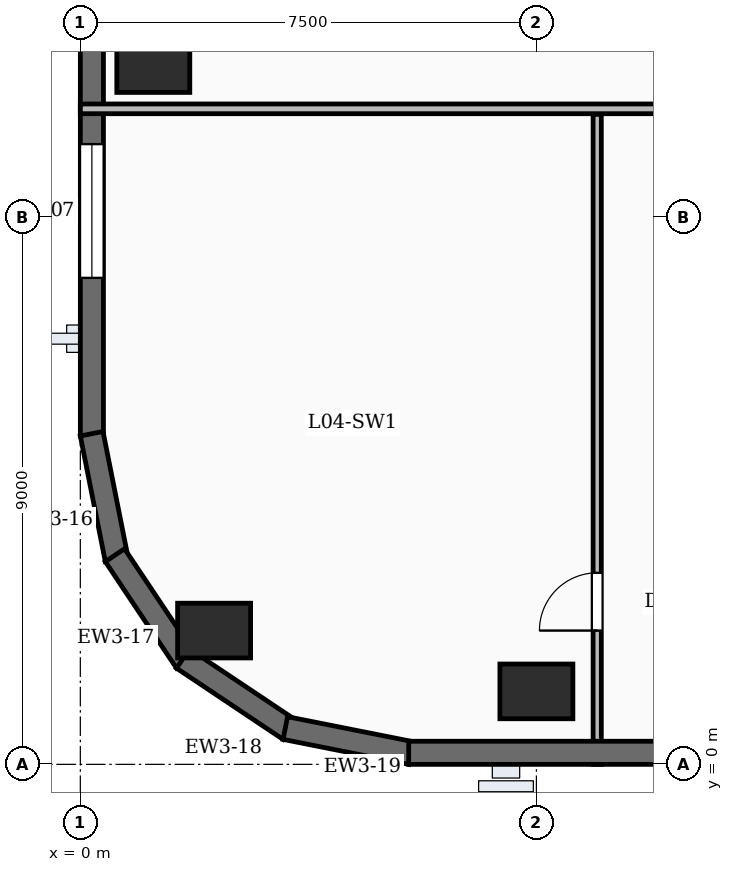
"""IFC4 building model, lengths in metres.
Left out: names, types, materials, properties, quantities, classifications, styles, units other than length and angle.
Written with IfcOpenShell. Run it as: python <this file> out.ifc"""

import sys

from ifc_helpers import new_model, si_unit, direction, frame, frame_2d, origin, origin_2d, place, context, subcontext, project, spatial, rectangle, extrude, element, fill, save


model = new_model("IFC4")
c1 = context("Model", 3, precision=1e-05, world=origin(), true_north=direction((0.0, 1.0)))
c2 = subcontext(c1, "Body", "Model", "MODEL_VIEW")
j1 = project(units=[si_unit("LENGTHUNIT", "METRE"), si_unit("PLANEANGLEUNIT", "RADIAN")], contexts=[c1])
p1 = place(None, origin())
s1 = spatial("IfcSite", under=j1, at=p1, CompositionType="ELEMENT")
p2 = place(p1, origin())
s2 = spatial("IfcBuilding", under=s1, at=p2, CompositionType="ELEMENT")
p3 = place(p2, frame((0.0, 0.0, 23.0)))
s3 = spatial("IfcBuildingStorey", under=s2, at=p3, CompositionType="ELEMENT", Elevation=23.0)
for number, where, z_axis, x_axis in (
    (1, (2.2, 2.2, -0.35), (0.0, 0.0, 1.0), (1.0, 0.0, 0.0)),
    (2, (7.5, 1.2, -0.35), (0.0, 0.0, 1.0), (1.0, 0.0, 0.0)),
    (3, (1.2, 11.5, -0.35), (0.0, 0.0, 1.0), (1.0, 0.0, 0.0)),
):
    element("IfcColumn", number, at=place(p3, frame(where, z_axis=z_axis, x_axis=x_axis)), inside=s3, PredefinedType="COLUMN", context=c2, shape_type="SweptSolid", body=[
        extrude(rectangle(XDim=1.2, YDim=0.9, at=origin_2d()), origin(), (0.0, 0.0, 1.0), 5.0),
    ])
p4 = place(p3, frame((0.19, 5.4, 0.0), z_axis=(0.0, 0.0, 1.0), x_axis=(0.0, 1.0, 0.0)))
e4 = element("IfcWall", 4, at=p4, inside=s3, PredefinedType="SOLIDWALL", context=c2, shape_type="SweptSolid", body=[
    extrude(rectangle(XDim=43.7, YDim=0.38, at=frame_2d((21.85, 0.0))), origin(), (0.0, 0.0, 1.0), 4.65),
])
p5 = place(p4, frame((2.6, 0.0, 0.95)))
e5 = element("IfcOpeningElement", 5, at=p5, cuts=e4, PredefinedType="OPENING", context=c2, shape_type="SweptSolid", body=[
    extrude(rectangle(XDim=2.2, YDim=2.5, at=frame_2d((1.1, 1.25))), frame((0.0, 0.2, 0.0), z_axis=(0.0, -1.0, 0.0), x_axis=(1.0, 0.0, 0.0)), (0.0, 0.0, 1.0), 0.4),
])
p6 = place(p4, frame((8.0, 0.0, 0.95)))
e6 = element("IfcOpeningElement", 6, at=p6, cuts=e4, PredefinedType="OPENING", context=c2, shape_type="SweptSolid", body=[
    extrude(rectangle(XDim=2.2, YDim=2.5, at=frame_2d((1.1, 1.25))), frame((0.0, 0.2, 0.0), z_axis=(0.0, -1.0, 0.0), x_axis=(1.0, 0.0, 0.0)), (0.0, 0.0, 1.0), 0.4),
])
p7 = place(p4, frame((18.8, 0.0, 0.95)))
e7 = element("IfcOpeningElement", 7, at=p7, cuts=e4, PredefinedType="OPENING", context=c2, shape_type="SweptSolid", body=[
    extrude(rectangle(XDim=2.2, YDim=2.5, at=frame_2d((1.1, 1.25))), frame((0.0, 0.2, 0.0), z_axis=(0.0, -1.0, 0.0), x_axis=(1.0, 0.0, 0.0)), (0.0, 0.0, 1.0), 0.4),
])
p8 = place(p4, frame((24.2, 0.0, 0.95)))
e8 = element("IfcOpeningElement", 8, at=p8, cuts=e4, PredefinedType="OPENING", context=c2, shape_type="SweptSolid", body=[
    extrude(rectangle(XDim=2.2, YDim=2.5, at=frame_2d((1.1, 1.25))), frame((0.0, 0.2, 0.0), z_axis=(0.0, -1.0, 0.0), x_axis=(1.0, 0.0, 0.0)), (0.0, 0.0, 1.0), 0.4),
])
p9 = place(p4, frame((29.6, 0.0, 0.95)))
e9 = element("IfcOpeningElement", 9, at=p9, cuts=e4, PredefinedType="OPENING", context=c2, shape_type="SweptSolid", body=[
    extrude(rectangle(XDim=2.2, YDim=2.5, at=frame_2d((1.1, 1.25))), frame((0.0, 0.2, 0.0), z_axis=(0.0, -1.0, 0.0), x_axis=(1.0, 0.0, 0.0)), (0.0, 0.0, 1.0), 0.4),
])
for number, where, z_axis, x_axis in (
    (10, (0.597, 3.371, 0.0), (0.0, 0.0, 1.0), (-0.195, 0.981, 0.0)),
    (11, (1.74, 1.687, 0.0), (0.0, 0.0, 1.0), (-0.556, 0.832, 0.0)),
    (12, (3.439, 0.569, 0.0), (0.0, 0.0, 1.0), (-0.832, 0.556, 0.0)),
    (13, (5.437, 0.186, 0.0), (0.0, 0.0, 1.0), (-0.981, 0.195, 0.0)),
):
    element("IfcWall", number, at=place(p3, frame(where, z_axis=z_axis, x_axis=x_axis)), inside=s3, PredefinedType="SOLIDWALL", context=c2, shape_type="SweptSolid", body=[
        extrude(rectangle(XDim=2.107, YDim=0.38, at=frame_2d((1.053, 0.0))), origin(), (0.0, 0.0, 1.0), 4.65),
    ])
p10 = place(p3, frame((74.1, 0.19, 0.0), z_axis=(0.0, 0.0, 1.0), x_axis=(-1.0, 0.0, 0.0)))
e14 = element("IfcWall", 14, at=p10, inside=s3, PredefinedType="SOLIDWALL", context=c2, shape_type="SweptSolid", body=[
    extrude(rectangle(XDim=68.7, YDim=0.38, at=frame_2d((34.35, 0.0))), origin(), (0.0, 0.0, 1.0), 4.65),
])
p11 = place(p10, frame((2.6, 0.0, 0.95)))
e15 = element("IfcOpeningElement", 15, at=p11, cuts=e14, PredefinedType="OPENING", context=c2, shape_type="SweptSolid", body=[
    extrude(rectangle(XDim=2.2, YDim=2.5, at=frame_2d((1.1, 1.25))), frame((0.0, 0.2, 0.0), z_axis=(0.0, -1.0, 0.0), x_axis=(1.0, 0.0, 0.0)), (0.0, 0.0, 1.0), 0.4),
])
p12 = place(p10, frame((29.6, 0.0, 0.95)))
e16 = element("IfcOpeningElement", 16, at=p12, cuts=e14, PredefinedType="OPENING", context=c2, shape_type="SweptSolid", body=[
    extrude(rectangle(XDim=2.2, YDim=2.5, at=frame_2d((1.1, 1.25))), frame((0.0, 0.2, 0.0), z_axis=(0.0, -1.0, 0.0), x_axis=(1.0, 0.0, 0.0)), (0.0, 0.0, 1.0), 0.4),
])
p13 = place(p10, frame((40.4, 0.0, 0.95)))
e17 = element("IfcOpeningElement", 17, at=p13, cuts=e14, PredefinedType="OPENING", context=c2, shape_type="SweptSolid", body=[
    extrude(rectangle(XDim=2.2, YDim=2.5, at=frame_2d((1.1, 1.25))), frame((0.0, 0.2, 0.0), z_axis=(0.0, -1.0, 0.0), x_axis=(1.0, 0.0, 0.0)), (0.0, 0.0, 1.0), 0.4),
])
p14 = place(p10, frame((45.8, 0.0, 0.95)))
e18 = element("IfcOpeningElement", 18, at=p14, cuts=e14, PredefinedType="OPENING", context=c2, shape_type="SweptSolid", body=[
    extrude(rectangle(XDim=2.2, YDim=2.5, at=frame_2d((1.1, 1.25))), frame((0.0, 0.2, 0.0), z_axis=(0.0, -1.0, 0.0), x_axis=(1.0, 0.0, 0.0)), (0.0, 0.0, 1.0), 0.4),
])
p15 = place(p10, frame((51.2, 0.0, 0.95)))
e19 = element("IfcOpeningElement", 19, at=p15, cuts=e14, PredefinedType="OPENING", context=c2, shape_type="SweptSolid", body=[
    extrude(rectangle(XDim=2.2, YDim=2.5, at=frame_2d((1.1, 1.25))), frame((0.0, 0.2, 0.0), z_axis=(0.0, -1.0, 0.0), x_axis=(1.0, 0.0, 0.0)), (0.0, 0.0, 1.0), 0.4),
])
p16 = place(p10, frame((56.6, 0.0, 0.95)))
e20 = element("IfcOpeningElement", 20, at=p16, cuts=e14, PredefinedType="OPENING", context=c2, shape_type="SweptSolid", body=[
    extrude(rectangle(XDim=2.2, YDim=2.5, at=frame_2d((1.1, 1.25))), frame((0.0, 0.2, 0.0), z_axis=(0.0, -1.0, 0.0), x_axis=(1.0, 0.0, 0.0)), (0.0, 0.0, 1.0), 0.4),
])
p17 = place(p10, frame((62.0, 0.0, 0.95)))
e21 = element("IfcOpeningElement", 21, at=p17, cuts=e14, PredefinedType="OPENING", context=c2, shape_type="SweptSolid", body=[
    extrude(rectangle(XDim=2.2, YDim=2.5, at=frame_2d((1.1, 1.25))), frame((0.0, 0.2, 0.0), z_axis=(0.0, -1.0, 0.0), x_axis=(1.0, 0.0, 0.0)), (0.0, 0.0, 1.0), 0.4),
])
p18 = place(p3, frame((8.5, 0.0, 0.0), z_axis=(0.0, 0.0, 1.0), x_axis=(0.0, 1.0, 0.0)))
e22 = element("IfcWall", 22, at=p18, inside=s3, PredefinedType="PARTITIONING", context=c2, shape_type="SweptSolid", body=[
    extrude(rectangle(XDim=10.69, YDim=0.135, at=frame_2d((5.345, 0.0))), origin(), (0.0, 0.0, 1.0), 3.71),
])
p19 = place(p18, frame((2.2, 0.0, 0.0)))
e23 = element("IfcOpeningElement", 23, at=p19, cuts=e22, PredefinedType="OPENING", context=c2, shape_type="SweptSolid", body=[
    extrude(rectangle(XDim=0.95, YDim=2.15, at=frame_2d((0.475, 1.075))), frame((0.0, 0.077, 0.0), z_axis=(0.0, -1.0, 0.0), x_axis=(1.0, 0.0, 0.0)), (0.0, 0.0, 1.0), 0.155),
])
p20 = place(p3, frame((0.0, 10.78, 0.0), z_axis=(0.0, 0.0, 1.0), x_axis=(1.0, 0.0, 0.0)))
e24 = element("IfcWall", 24, at=p20, inside=s3, PredefinedType="PARTITIONING", context=c2, shape_type="SweptSolid", body=[
    extrude(rectangle(XDim=24.8, YDim=0.16, at=frame_2d((12.4, 0.0))), origin(), (0.0, 0.0, 1.0), 3.71),
])
p21 = place(p20, frame((16.67, 0.0, 0.0)))
e25 = element("IfcOpeningElement", 25, at=p21, cuts=e24, PredefinedType="OPENING", context=c2, shape_type="SweptSolid", body=[
    extrude(rectangle(XDim=0.95, YDim=2.15, at=frame_2d((0.475, 1.075))), frame((0.0, 0.09, 0.0), z_axis=(0.0, -1.0, 0.0), x_axis=(1.0, 0.0, 0.0)), (0.0, 0.0, 1.0), 0.18),
])
p22 = place(p20, frame((21.82, 0.0, 0.0)))
e26 = element("IfcOpeningElement", 26, at=p22, cuts=e24, PredefinedType="OPENING", context=c2, shape_type="SweptSolid", body=[
    extrude(rectangle(XDim=0.95, YDim=2.15, at=frame_2d((0.475, 1.075))), frame((0.0, 0.09, 0.0), z_axis=(0.0, -1.0, 0.0), x_axis=(1.0, 0.0, 0.0)), (0.0, 0.0, 1.0), 0.18),
])
p23 = place(p5, origin())
e27 = element("IfcWindow", 27, at=p23, inside=s3, PartitioningType="DOUBLE_PANEL_VERTICAL", PredefinedType="WINDOW", context=c2, shape_type="SweptSolid", body=[
    extrude(rectangle(XDim=2.2, YDim=2.5, at=frame_2d((1.1, 1.25))), frame((0.0, 0.03, 0.0), z_axis=(0.0, -1.0, 0.0), x_axis=(1.0, 0.0, 0.0)), (0.0, 0.0, 1.0), 0.06),
])
fill(e5, e27)
p24 = place(p19, origin())
e28 = element("IfcDoor", 28, at=p24, inside=s3, OperationType="SINGLE_SWING_LEFT", PredefinedType="DOOR", context=c2, shape_type="SweptSolid", body=[
    extrude(rectangle(XDim=0.95, YDim=2.15, at=frame_2d((0.475, 1.075))), frame((0.0, 0.025, 0.0), z_axis=(0.0, -1.0, 0.0), x_axis=(1.0, 0.0, 0.0)), (0.0, 0.0, 1.0), 0.05),
])
fill(e23, e28)
save(model, sys.argv[1])
